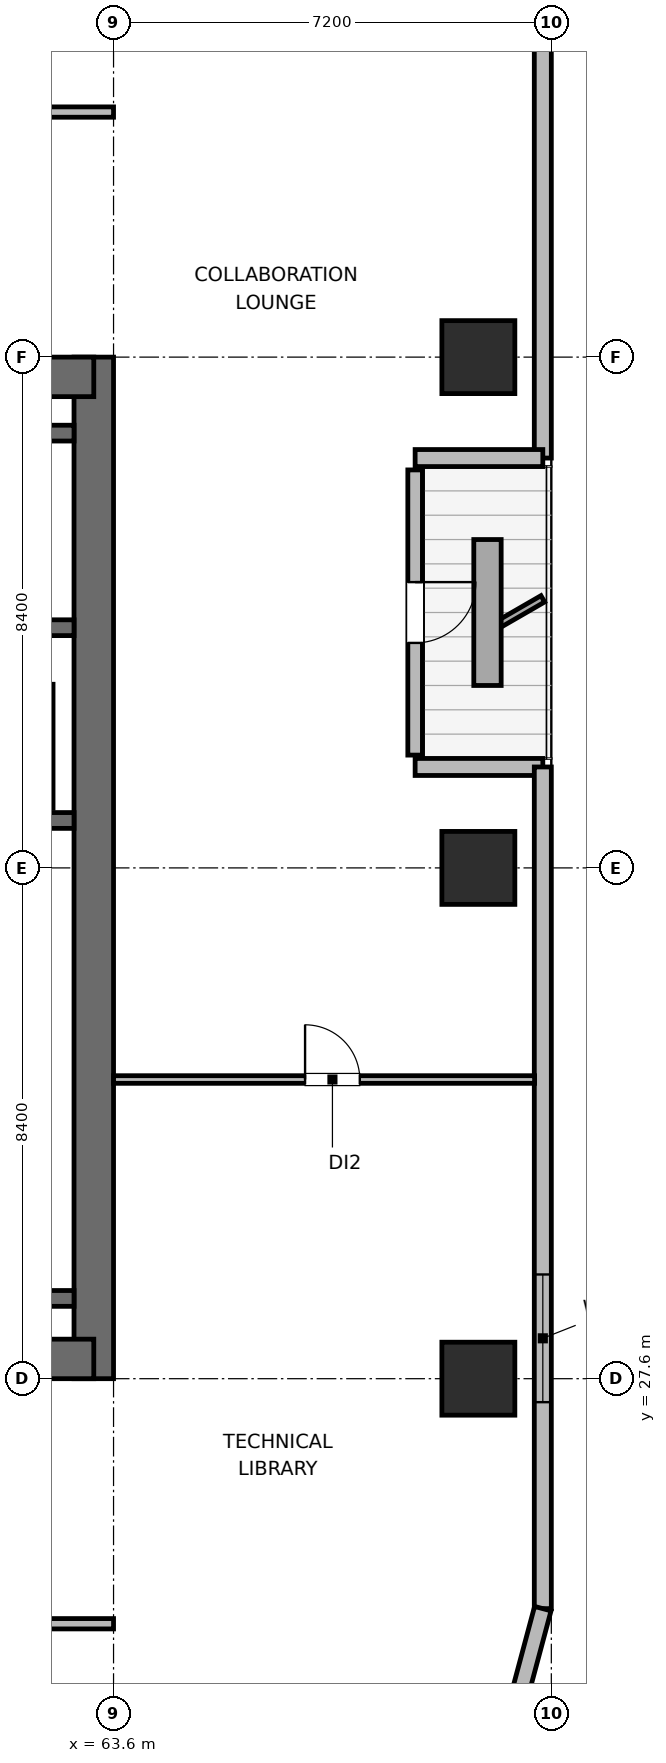
"""IFC4 building model, lengths in metres.
Left out: names, types, materials, properties, quantities, classifications, styles, units other than length and angle.
Written with IfcOpenShell. Run it as: python <this file> out.ifc"""

import sys

from ifc_helpers import new_model, si_unit, direction, frame, frame_2d, origin, origin_2d, place, context, subcontext, project, spatial, rectangle, extrude, element, fill, save


model = new_model("IFC4")
c1 = context("Model", 3, precision=1e-05, world=origin(), true_north=direction((0.0, 1.0)))
c2 = subcontext(c1, "Body", "Model", "MODEL_VIEW")
j1 = project(units=[si_unit("LENGTHUNIT", "METRE"), si_unit("PLANEANGLEUNIT", "RADIAN")], contexts=[c1])
p1 = place(None, origin())
s1 = spatial("IfcSite", under=j1, at=p1, CompositionType="ELEMENT")
p2 = place(p1, origin())
s2 = spatial("IfcBuilding", under=s1, at=p2, CompositionType="ELEMENT")
p3 = place(p2, frame((0.0, 0.0, 223.2)))
s3 = spatial("IfcBuildingStorey", under=s2, at=p3, CompositionType="ELEMENT", Elevation=223.2)
p4 = place(p3, frame((63.275, 27.6, 0.0), z_axis=(0.0, 0.0, 1.0), x_axis=(0.0, 1.0, 0.0)))
e1 = element("IfcWall", 1, at=p4, inside=s3, PredefinedType="SHEAR", context=c2, shape_type="SweptSolid", body=[
    extrude(rectangle(XDim=16.8, YDim=0.65, at=frame_2d((8.4, 0.0))), origin(), (0.0, 0.0, 1.0), 3.9),
])
p5 = place(p3, frame((53.925, 27.925, 0.0), z_axis=(0.0, 0.0, 1.0), x_axis=(1.0, 0.0, 0.0)))
e2 = element("IfcWall", 2, at=p5, inside=s3, PredefinedType="SHEAR", context=c2, shape_type="SweptSolid", body=[
    extrude(rectangle(XDim=9.35, YDim=0.65, at=frame_2d((4.675, 0.0))), origin(), (0.0, 0.0, 1.0), 3.9),
])
p6 = place(p5, frame((3.975, 0.0, 0.0)))
e3 = element("IfcOpeningElement", 3, at=p6, cuts=e2, PredefinedType="OPENING", context=c2, shape_type="SweptSolid", body=[
    extrude(rectangle(XDim=1.05, YDim=2.04, at=frame_2d((0.525, 1.02))), frame((0.0, 0.335, 0.0), z_axis=(0.0, -1.0, 0.0), x_axis=(1.0, 0.0, 0.0)), (0.0, 0.0, 1.0), 0.67),
])
p7 = place(p3, frame((53.925, 44.075, 0.0), z_axis=(0.0, 0.0, 1.0), x_axis=(1.0, 0.0, 0.0)))
e4 = element("IfcWall", 4, at=p7, inside=s3, PredefinedType="SHEAR", context=c2, shape_type="SweptSolid", body=[
    extrude(rectangle(XDim=9.35, YDim=0.65, at=frame_2d((4.675, 0.0))), origin(), (0.0, 0.0, 1.0), 3.9),
])
for number, where, z_axis, x_axis in (
    (5, (58.89, 28.92, 0.0), (0.0, 0.0, 1.0), (1.0, 0.0, 0.0)),
    (6, (58.89, 36.78, 0.0), (0.0, 0.0, 1.0), (1.0, 0.0, 0.0)),
):
    element("IfcWall", number, at=place(p3, frame(where, z_axis=z_axis, x_axis=x_axis)), inside=s3, PredefinedType="SHEAR", context=c2, shape_type="SweptSolid", body=[
        extrude(rectangle(XDim=4.06, YDim=0.26, at=frame_2d((2.03, 0.0))), origin(), (0.0, 0.0, 1.0), 3.9),
    ])
p8 = place(p3, frame((54.25, 39.95, 0.0), z_axis=(0.0, 0.0, 1.0), x_axis=(1.0, 0.0, 0.0)))
e7 = element("IfcWall", 7, at=p8, inside=s3, PredefinedType="SHEAR", context=c2, shape_type="SweptSolid", body=[
    extrude(rectangle(XDim=8.7, YDim=0.26, at=frame_2d((4.35, 0.0))), origin(), (0.0, 0.0, 1.0), 3.9),
])
p9 = place(p8, frame((0.95, 0.0, 0.0)))
e8 = element("IfcOpeningElement", 8, at=p9, cuts=e7, PredefinedType="OPENING", context=c2, shape_type="SweptSolid", body=[
    extrude(rectangle(XDim=1.0, YDim=2.04, at=frame_2d((0.5, 1.02))), frame((0.0, 0.14, 0.0), z_axis=(0.0, -1.0, 0.0), x_axis=(1.0, 0.0, 0.0)), (0.0, 0.0, 1.0), 0.28),
])
p10 = place(p3, frame((54.25, 43.15, 0.0), z_axis=(0.0, 0.0, 1.0), x_axis=(1.0, 0.0, 0.0)))
e9 = element("IfcWall", 9, at=p10, inside=s3, PredefinedType="SHEAR", context=c2, shape_type="SweptSolid", body=[
    extrude(rectangle(XDim=8.7, YDim=0.26, at=frame_2d((4.35, 0.0))), origin(), (0.0, 0.0, 1.0), 3.9),
])
for number, where, z_axis, x_axis in (
    (10, (69.6, 27.6, 0.0), (0.0, 0.0, 1.0), (1.0, 0.0, 0.0)),
    (11, (69.6, 36.0, 0.0), (0.0, 0.0, 1.0), (1.0, 0.0, 0.0)),
    (12, (69.6, 44.4, 0.0), (0.0, 0.0, 1.0), (1.0, 0.0, 0.0)),
):
    element("IfcColumn", number, at=place(p3, frame(where, z_axis=z_axis, x_axis=x_axis)), inside=s3, PredefinedType="COLUMN", context=c2, shape_type="SweptSolid", body=[
        extrude(rectangle(XDim=1.2, YDim=1.2, at=origin_2d()), origin(), (0.0, 0.0, 1.0), 3.9),
    ])
p11 = place(p3, frame((70.66, 57.182, 0.0), z_axis=(0.0, 0.0, 1.0), x_axis=(0.0, -1.0, 0.0)))
e13 = element("IfcWall", 13, at=p11, inside=s3, PredefinedType="SOLIDWALL", context=c2, shape_type="SweptSolid", body=[
    extrude(rectangle(XDim=14.442, YDim=0.28, at=frame_2d((7.221, 0.0))), origin(), (0.0, 0.0, 1.0), 3.68),
])
p12 = place(p3, frame((70.66, 42.74, 0.0), z_axis=(0.0, 0.0, 1.0), x_axis=(-1.0, 0.0, 0.0)))
e14 = element("IfcWall", 14, at=p12, inside=s3, PredefinedType="SOLIDWALL", context=c2, shape_type="SweptSolid", body=[
    extrude(rectangle(XDim=2.1, YDim=0.28, at=frame_2d((1.05, 0.0))), origin(), (0.0, 0.0, 1.0), 3.116),
])
p13 = place(p3, frame((68.56, 42.545, 0.0), z_axis=(0.0, 0.0, 1.0), x_axis=(0.0, -1.0, 0.0)))
e15 = element("IfcWall", 15, at=p13, inside=s3, PredefinedType="SOLIDWALL", context=c2, shape_type="SweptSolid", body=[
    extrude(rectangle(XDim=4.69, YDim=0.24, at=frame_2d((2.345, 0.0))), origin(), (0.0, 0.0, 1.0), 3.248),
])
p14 = place(p13, frame((1.845, 0.0, 0.0)))
e16 = element("IfcOpeningElement", 16, at=p14, cuts=e15, PredefinedType="OPENING", context=c2, shape_type="SweptSolid", body=[
    extrude(rectangle(XDim=1.0, YDim=2.02, at=frame_2d((0.5, 1.01))), frame((0.0, 0.13, 0.0), z_axis=(0.0, -1.0, 0.0), x_axis=(1.0, 0.0, 0.0)), (0.0, 0.0, 1.0), 0.26),
])
p15 = place(p3, frame((68.56, 37.66, 0.0), z_axis=(0.0, 0.0, 1.0), x_axis=(1.0, 0.0, 0.0)))
e17 = element("IfcWall", 17, at=p15, inside=s3, PredefinedType="SOLIDWALL", context=c2, shape_type="SweptSolid", body=[
    extrude(rectangle(XDim=2.1, YDim=0.28, at=frame_2d((1.05, 0.0))), origin(), (0.0, 0.0, 1.0), 3.116),
])
p16 = place(p3, frame((70.66, 37.66, 0.0), z_axis=(0.0, 0.0, 1.0), x_axis=(0.0, -1.0, 0.0)))
e18 = element("IfcWall", 18, at=p16, inside=s3, PredefinedType="SOLIDWALL", context=c2, shape_type="SweptSolid", body=[
    extrude(rectangle(XDim=13.842, YDim=0.28, at=frame_2d((6.921, 0.0))), origin(), (0.0, 0.0, 1.0), 3.68),
])
p17 = place(p16, frame((8.346, 0.0, 0.85)))
e19 = element("IfcOpeningElement", 19, at=p17, cuts=e18, PredefinedType="OPENING", context=c2, shape_type="SweptSolid", body=[
    extrude(rectangle(XDim=2.1, YDim=1.05, at=frame_2d((1.05, 0.525))), frame((0.0, 0.15, 0.0), z_axis=(0.0, -1.0, 0.0), x_axis=(1.0, 0.0, 0.0)), (0.0, 0.0, 1.0), 0.3),
])
p18 = place(p3, frame((70.66, 23.818, 0.0), z_axis=(0.0, 0.0, 1.0), x_axis=(-0.2588904131, -0.965906700466, 0.0)))
e20 = element("IfcWall", 20, at=p18, inside=s3, PredefinedType="SOLIDWALL", context=c2, shape_type="SweptSolid", body=[
    extrude(rectangle(XDim=2.636, YDim=0.28, at=frame_2d((1.318, 0.0))), origin(), (0.0, 0.0, 1.0), 3.68),
])
p19 = place(p3, frame((62.5, 36.98, 0.0), z_axis=(0.0, 0.0, 1.0), x_axis=(0.0, 1.0, 0.0)))
e21 = element("IfcWall", 21, at=p19, inside=s3, PredefinedType="PARTITIONING", context=c2, shape_type="SweptSolid", body=[
    extrude(rectangle(XDim=2.04, YDim=0.21, at=frame_2d((1.02, 0.0))), origin(), (0.0, 0.0, 1.0), 3.68),
])
p20 = place(p3, frame((28.7, 23.57, 0.0), z_axis=(0.0, 0.0, 1.0), x_axis=(1.0, 0.0, 0.0)))
e22 = element("IfcWall", 22, at=p20, inside=s3, PredefinedType="PARTITIONING", context=c2, shape_type="SweptSolid", body=[
    extrude(rectangle(XDim=34.9, YDim=0.17, at=frame_2d((17.45, 0.0))), origin(), (0.0, 0.0, 1.0), 3.68),
])
p21 = place(p20, frame((5.54, 0.0, 0.0)))
e23 = element("IfcOpeningElement", 23, at=p21, cuts=e22, PredefinedType="OPENING", context=c2, shape_type="SweptSolid", body=[
    extrude(rectangle(XDim=0.95, YDim=2.04, at=frame_2d((0.475, 1.02))), frame((0.0, 0.095, 0.0), z_axis=(0.0, -1.0, 0.0), x_axis=(1.0, 0.0, 0.0)), (0.0, 0.0, 1.0), 0.19),
])
p22 = place(p20, frame((16.975, 0.0, 0.0)))
e24 = element("IfcOpeningElement", 24, at=p22, cuts=e22, PredefinedType="OPENING", context=c2, shape_type="SweptSolid", body=[
    extrude(rectangle(XDim=0.95, YDim=2.04, at=frame_2d((0.475, 1.02))), frame((0.0, 0.095, 0.0), z_axis=(0.0, -1.0, 0.0), x_axis=(1.0, 0.0, 0.0)), (0.0, 0.0, 1.0), 0.19),
])
p23 = place(p20, frame((28.41, 0.0, 0.0)))
e25 = element("IfcOpeningElement", 25, at=p23, cuts=e22, PredefinedType="OPENING", context=c2, shape_type="SweptSolid", body=[
    extrude(rectangle(XDim=0.95, YDim=2.04, at=frame_2d((0.475, 1.02))), frame((0.0, 0.095, 0.0), z_axis=(0.0, -1.0, 0.0), x_axis=(1.0, 0.0, 0.0)), (0.0, 0.0, 1.0), 0.19),
])
p24 = place(p3, frame((28.7, 48.43, 0.0), z_axis=(0.0, 0.0, 1.0), x_axis=(1.0, 0.0, 0.0)))
e26 = element("IfcWall", 26, at=p24, inside=s3, PredefinedType="PARTITIONING", context=c2, shape_type="SweptSolid", body=[
    extrude(rectangle(XDim=34.9, YDim=0.17, at=frame_2d((17.45, 0.0))), origin(), (0.0, 0.0, 1.0), 3.68),
])
p25 = place(p24, frame((4.025, 0.0, 0.0)))
e27 = element("IfcOpeningElement", 27, at=p25, cuts=e26, PredefinedType="OPENING", context=c2, shape_type="SweptSolid", body=[
    extrude(rectangle(XDim=0.95, YDim=2.04, at=frame_2d((0.475, 1.02))), frame((0.0, 0.095, 0.0), z_axis=(0.0, -1.0, 0.0), x_axis=(1.0, 0.0, 0.0)), (0.0, 0.0, 1.0), 0.19),
])
p26 = place(p24, frame((9.96, 0.0, 0.0)))
e28 = element("IfcOpeningElement", 28, at=p26, cuts=e26, PredefinedType="OPENING", context=c2, shape_type="SweptSolid", body=[
    extrude(rectangle(XDim=0.95, YDim=2.04, at=frame_2d((0.475, 1.02))), frame((0.0, 0.095, 0.0), z_axis=(0.0, -1.0, 0.0), x_axis=(1.0, 0.0, 0.0)), (0.0, 0.0, 1.0), 0.19),
])
p27 = place(p24, frame((15.94, 0.0, 0.0)))
e29 = element("IfcOpeningElement", 29, at=p27, cuts=e26, PredefinedType="OPENING", context=c2, shape_type="SweptSolid", body=[
    extrude(rectangle(XDim=0.95, YDim=2.04, at=frame_2d((0.475, 1.02))), frame((0.0, 0.095, 0.0), z_axis=(0.0, -1.0, 0.0), x_axis=(1.0, 0.0, 0.0)), (0.0, 0.0, 1.0), 0.19),
])
p28 = place(p24, frame((23.35, 0.0, 0.0)))
e30 = element("IfcOpeningElement", 30, at=p28, cuts=e26, PredefinedType="OPENING", context=c2, shape_type="SweptSolid", body=[
    extrude(rectangle(XDim=0.95, YDim=2.04, at=frame_2d((0.475, 1.02))), frame((0.0, 0.095, 0.0), z_axis=(0.0, -1.0, 0.0), x_axis=(1.0, 0.0, 0.0)), (0.0, 0.0, 1.0), 0.19),
])
p29 = place(p24, frame((30.32, 0.0, 0.0)))
e31 = element("IfcOpeningElement", 31, at=p29, cuts=e26, PredefinedType="OPENING", context=c2, shape_type="SweptSolid", body=[
    extrude(rectangle(XDim=0.95, YDim=2.04, at=frame_2d((0.475, 1.02))), frame((0.0, 0.095, 0.0), z_axis=(0.0, -1.0, 0.0), x_axis=(1.0, 0.0, 0.0)), (0.0, 0.0, 1.0), 0.19),
])
p30 = place(p3, frame((63.6, 32.52, 0.0), z_axis=(0.0, 0.0, 1.0), x_axis=(1.0, 0.0, 0.0)))
e32 = element("IfcWall", 32, at=p30, inside=s3, PredefinedType="PARTITIONING", context=c2, shape_type="SweptSolid", body=[
    extrude(rectangle(XDim=6.925, YDim=0.125, at=frame_2d((3.462, 0.0))), origin(), (0.0, 0.0, 1.0), 3.68),
])
p31 = place(p30, frame((3.15, 0.0, 0.0)))
e33 = element("IfcOpeningElement", 33, at=p31, cuts=e32, PredefinedType="OPENING", context=c2, shape_type="SweptSolid", body=[
    extrude(rectangle(XDim=0.9, YDim=2.02, at=frame_2d((0.45, 1.01))), frame((0.0, 0.073, 0.0), z_axis=(0.0, -1.0, 0.0), x_axis=(1.0, 0.0, 0.0)), (0.0, 0.0, 1.0), 0.145),
])
p32 = place(p14, origin())
e34 = element("IfcDoor", 34, at=p32, inside=s3, OperationType="SINGLE_SWING_LEFT", PredefinedType="DOOR", context=c2, shape_type="SweptSolid", body=[
    extrude(rectangle(XDim=1.0, YDim=2.02, at=frame_2d((0.5, 1.01))), frame((0.0, 0.025, 0.0), z_axis=(0.0, -1.0, 0.0), x_axis=(1.0, 0.0, 0.0)), (0.0, 0.0, 1.0), 0.05),
])
fill(e16, e34)
p33 = place(p17, origin())
e35 = element("IfcWindow", 35, at=p33, inside=s3, PartitioningType="SINGLE_PANEL", PredefinedType="WINDOW", context=c2, shape_type="SweptSolid", body=[
    extrude(rectangle(XDim=2.1, YDim=1.05, at=frame_2d((1.05, 0.525))), frame((0.0, 0.03, 0.0), z_axis=(0.0, -1.0, 0.0), x_axis=(1.0, 0.0, 0.0)), (0.0, 0.0, 1.0), 0.06),
])
fill(e19, e35)
p34 = place(p31, origin())
e36 = element("IfcDoor", 36, at=p34, inside=s3, OperationType="SINGLE_SWING_LEFT", PredefinedType="DOOR", context=c2, shape_type="SweptSolid", body=[
    extrude(rectangle(XDim=0.9, YDim=2.02, at=frame_2d((0.45, 1.01))), frame((0.0, 0.025, 0.0), z_axis=(0.0, -1.0, 0.0), x_axis=(1.0, 0.0, 0.0)), (0.0, 0.0, 1.0), 0.05),
])
fill(e33, e36)
save(model, sys.argv[1])
